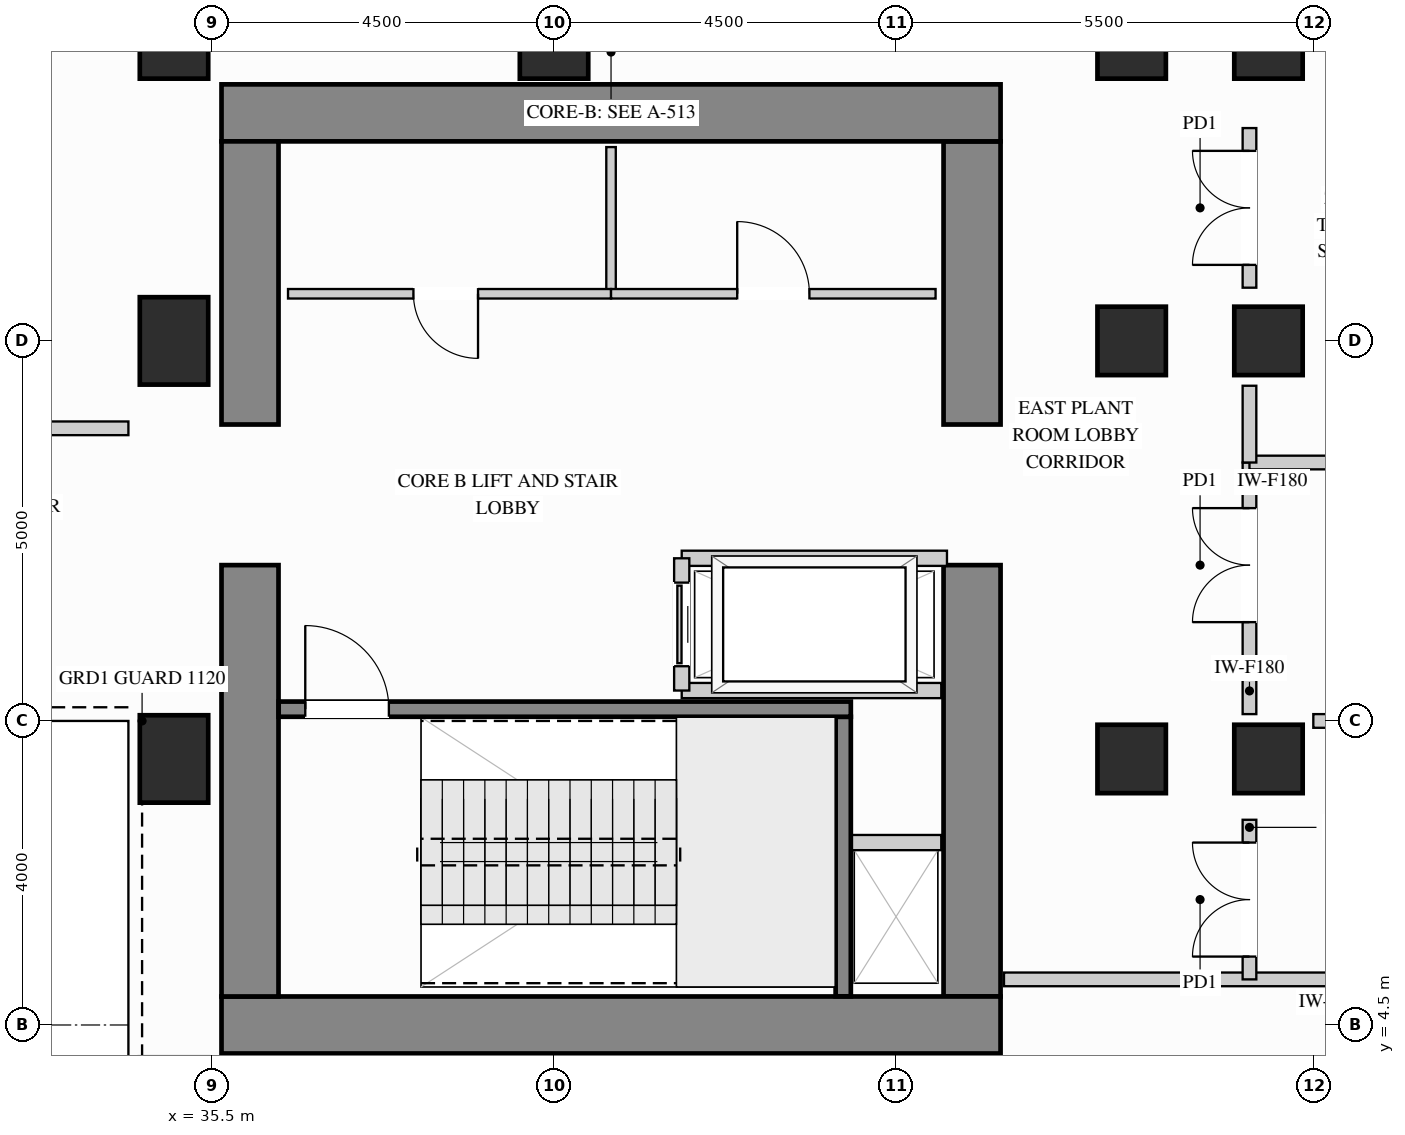
"""IFC4 building model, lengths in metres.
Left out: names, types, materials, properties, quantities, classifications, styles, units other than length and angle.
Written with IfcOpenShell. Run it as: python <this file> out.ifc"""

import sys

from ifc_helpers import new_model, si_unit, direction, frame, frame_2d, origin, origin_2d, place, context, subcontext, project, spatial, rectangle, extrude, source, transform, mapped, element, fill, save


model = new_model("IFC4")
c1 = context("Model", 3, precision=1e-05, world=origin(), true_north=direction((0.0, 1.0)))
c2 = subcontext(c1, "Body", "Model", "MODEL_VIEW")
j1 = project(units=[si_unit("LENGTHUNIT", "METRE"), si_unit("PLANEANGLEUNIT", "RADIAN")], contexts=[c1])
p1 = place(None, origin())
s1 = spatial("IfcSite", under=j1, at=p1, CompositionType="ELEMENT")
p2 = place(p1, origin())
s2 = spatial("IfcBuilding", under=s1, at=p2, CompositionType="ELEMENT")
p3 = place(p2, frame((0.0, 0.0, 138.6)))
s3 = spatial("IfcBuildingStorey", under=s2, at=p3, CompositionType="ELEMENT", Elevation=138.6)
m1 = source(origin(), c2, "Body", "SweptSolid", [
    extrude(rectangle(XDim=0.9, YDim=0.9, at=origin_2d()), origin(), (0.0, 0.0, 1.0), 4.26),
])
for number, where, z_axis, x_axis in (
    (1, (47.6, 13.5, 0.0), (0.0, 0.0, 1.0), (1.0, 0.0, 0.0)),
    (2, (47.6, 8.0, 0.0), (0.0, 0.0, 1.0), (1.0, 0.0, 0.0)),
    (3, (35.0, 17.4, 0.0), (0.0, 0.0, 1.0), (1.0, 0.0, 0.0)),
    (4, (40.0, 17.4, 0.0), (0.0, 0.0, 1.0), (1.0, 0.0, 0.0)),
    (5, (47.6, 17.4, 0.0), (0.0, 0.0, 1.0), (1.0, 0.0, 0.0)),
    (6, (49.4, 13.5, 0.0), (0.0, 0.0, 1.0), (1.0, 0.0, 0.0)),
    (7, (49.4, 17.4, 0.0), (0.0, 0.0, 1.0), (1.0, 0.0, 0.0)),
    (8, (49.4, 8.0, 0.0), (0.0, 0.0, 1.0), (1.0, 0.0, 0.0)),
):
    element("IfcColumn", number, at=place(p3, frame(where, z_axis=z_axis, x_axis=x_axis)), inside=s3, PredefinedType="COLUMN", context=c2, shape_type="MappedRepresentation", body=[
        mapped(m1, transform((0.0, 0.0, 0.0), x_axis=(1.0, 0.0, 0.0), y_axis=(0.0, 1.0, 0.0), z_axis=(0.0, 0.0, 1.0))),
    ])
m2 = source(origin(), c2, "Body", "SweptSolid", [
    extrude(rectangle(XDim=0.9, YDim=1.15, at=origin_2d()), origin(), (0.0, 0.0, 1.0), 4.26),
])
for number, where, z_axis, x_axis in (
    (9, (35.0, 13.5, 0.0), (0.0, 0.0, 1.0), (1.0, 0.0, 0.0)),
    (10, (35.0, 8.0, 0.0), (0.0, 0.0, 1.0), (1.0, 0.0, 0.0)),
):
    element("IfcColumn", number, at=place(p3, frame(where, z_axis=z_axis, x_axis=x_axis)), inside=s3, PredefinedType="COLUMN", context=c2, shape_type="MappedRepresentation", body=[
        mapped(m2, transform((0.0, 0.0, 0.0), x_axis=(1.0, 0.0, 0.0), y_axis=(0.0, 1.0, 0.0), z_axis=(0.0, 0.0, 1.0))),
    ])
m3 = source(origin(), c2, "Body", "SweptSolid", [
    extrude(rectangle(XDim=5.675, YDim=0.75, at=frame_2d((2.837, 0.0))), origin(), (0.0, 0.0, 1.0), 4.26),
])
p4 = place(p3, frame((45.5, 4.875, 0.0), z_axis=(0.0, 0.0, 1.0), x_axis=(0.0, 1.0, 0.0)))
e11 = element("IfcWall", 11, at=p4, inside=s3, PredefinedType="SHEAR", context=c2, shape_type="MappedRepresentation", body=[
    mapped(m3, transform((0.0, 0.0, 0.0), x_axis=(1.0, 0.0, 0.0), y_axis=(0.0, 1.0, 0.0), z_axis=(0.0, 0.0, 1.0))),
])
m4 = source(origin(), c2, "Body", "SweptSolid", [
    extrude(rectangle(XDim=3.725, YDim=0.75, at=frame_2d((1.863, 0.0))), origin(), (0.0, 0.0, 1.0), 4.26),
])
p5 = place(p3, frame((45.5, 12.4, 0.0), z_axis=(0.0, 0.0, 1.0), x_axis=(0.0, 1.0, 0.0)))
e12 = element("IfcWall", 12, at=p5, inside=s3, PredefinedType="SHEAR", context=c2, shape_type="MappedRepresentation", body=[
    mapped(m4, transform((0.0, 0.0, 0.0), x_axis=(1.0, 0.0, 0.0), y_axis=(0.0, 1.0, 0.0), z_axis=(0.0, 0.0, 1.0))),
])
m5 = source(origin(), c2, "Body", "SweptSolid", [
    extrude(rectangle(XDim=10.25, YDim=0.75, at=frame_2d((5.125, 0.0))), origin(), (0.0, 0.0, 1.0), 4.26),
])
for number, where, z_axis, x_axis in (
    (13, (35.625, 16.5, 0.0), (0.0, 0.0, 1.0), (1.0, 0.0, 0.0)),
    (14, (35.625, 4.5, 0.0), (0.0, 0.0, 1.0), (1.0, 0.0, 0.0)),
):
    element("IfcWall", number, at=place(p3, frame(where, z_axis=z_axis, x_axis=x_axis)), inside=s3, PredefinedType="SHEAR", context=c2, shape_type="MappedRepresentation", body=[
        mapped(m5, transform((0.0, 0.0, 0.0), x_axis=(1.0, 0.0, 0.0), y_axis=(0.0, 1.0, 0.0), z_axis=(0.0, 0.0, 1.0))),
    ])
p6 = place(p3, frame((36.0, 4.875, 0.0), z_axis=(0.0, 0.0, 1.0), x_axis=(0.0, 1.0, 0.0)))
e15 = element("IfcWall", 15, at=p6, inside=s3, PredefinedType="SHEAR", context=c2, shape_type="MappedRepresentation", body=[
    mapped(m3, transform((0.0, 0.0, 0.0), x_axis=(1.0, 0.0, 0.0), y_axis=(0.0, 1.0, 0.0), z_axis=(0.0, 0.0, 1.0))),
])
p7 = place(p3, frame((36.0, 12.4, 0.0), z_axis=(0.0, 0.0, 1.0), x_axis=(0.0, 1.0, 0.0)))
e16 = element("IfcWall", 16, at=p7, inside=s3, PredefinedType="SHEAR", context=c2, shape_type="MappedRepresentation", body=[
    mapped(m4, transform((0.0, 0.0, 0.0), x_axis=(1.0, 0.0, 0.0), y_axis=(0.0, 1.0, 0.0), z_axis=(0.0, 0.0, 1.0))),
])
p8 = place(p3, frame((49.15, 9.2, 0.0), z_axis=(0.0, 0.0, 1.0), x_axis=(0.0, 1.0, 0.0)))
e17 = element("IfcWall", 17, at=p8, inside=s3, PredefinedType="PARTITIONING", context=c2, shape_type="SweptSolid", body=[
    extrude(rectangle(XDim=2.7, YDim=0.18, at=frame_2d((1.35, 0.0))), origin(), (0.0, 0.0, 1.0), 3.245),
])
p9 = place(p8, frame((0.6, 0.0, 0.0)))
e18 = element("IfcOpeningElement", 18, at=p9, cuts=e17, PredefinedType="OPENING", context=c2, shape_type="SweptSolid", body=[
    extrude(rectangle(XDim=1.5, YDim=2.2, at=frame_2d((0.75, 1.1))), frame((0.0, 0.1, 0.0), z_axis=(0.0, -1.0, 0.0), x_axis=(1.0, 0.0, 0.0)), (0.0, 0.0, 1.0), 0.2),
])
m6 = source(origin(), c2, "Body", "SweptSolid", [
    extrude(rectangle(XDim=5.45, YDim=0.18, at=frame_2d((2.725, 0.0))), origin(), (0.0, 0.0, 1.0), 3.776),
])
p10 = place(p3, frame((49.15, 11.9, 0.0), z_axis=(0.0, 0.0, 1.0), x_axis=(1.0, 0.0, 0.0)))
e19 = element("IfcWall", 19, at=p10, inside=s3, PredefinedType="PARTITIONING", context=c2, shape_type="MappedRepresentation", body=[
    mapped(m6, transform((0.0, 0.0, 0.0), x_axis=(1.0, 0.0, 0.0), y_axis=(0.0, 1.0, 0.0), z_axis=(0.0, 0.0, 1.0))),
])
m7 = source(origin(), c2, "Body", "SweptSolid", [
    extrude(rectangle(XDim=8.68, YDim=0.18, at=frame_2d((4.34, 0.0))), origin(), (0.0, 0.0, 1.0), 4.245),
])
p11 = place(p3, frame((45.92, 5.1, 0.0), z_axis=(0.0, 0.0, 1.0), x_axis=(1.0, 0.0, 0.0)))
e20 = element("IfcWall", 20, at=p11, inside=s3, PredefinedType="PARTITIONING", context=c2, shape_type="MappedRepresentation", body=[
    mapped(m7, transform((0.0, 0.0, 0.0), x_axis=(1.0, 0.0, 0.0), y_axis=(0.0, 1.0, 0.0), z_axis=(0.0, 0.0, 1.0))),
])
p12 = place(p3, frame((49.15, 5.1, 0.0), z_axis=(0.0, 0.0, 1.0), x_axis=(0.0, 1.0, 0.0)))
e21 = element("IfcWall", 21, at=p12, inside=s3, PredefinedType="PARTITIONING", context=c2, shape_type="SweptSolid", body=[
    extrude(rectangle(XDim=2.1, YDim=0.18, at=frame_2d((1.05, 0.0))), origin(), (0.0, 0.0, 1.0), 3.245),
])
p13 = place(p12, frame((0.3, 0.0, 0.0)))
e22 = element("IfcOpeningElement", 22, at=p13, cuts=e21, PredefinedType="OPENING", context=c2, shape_type="SweptSolid", body=[
    extrude(rectangle(XDim=1.5, YDim=2.2, at=frame_2d((0.75, 1.1))), frame((0.0, 0.1, 0.0), z_axis=(0.0, -1.0, 0.0), x_axis=(1.0, 0.0, 0.0)), (0.0, 0.0, 1.0), 0.2),
])
m8 = source(origin(), c2, "Body", "SweptSolid", [
    extrude(rectangle(XDim=1.82, YDim=0.18, at=frame_2d((0.91, 0.0))), origin(), (0.0, 0.0, 1.0), 4.245),
])
p14 = place(p3, frame((49.99, 8.5, 0.0), z_axis=(0.0, 0.0, 1.0), x_axis=(1.0, 0.0, 0.0)))
e23 = element("IfcWall", 23, at=p14, inside=s3, PredefinedType="PARTITIONING", context=c2, shape_type="MappedRepresentation", body=[
    mapped(m8, transform((0.0, 0.0, 0.0), x_axis=(1.0, 0.0, 0.0), y_axis=(0.0, 1.0, 0.0), z_axis=(0.0, 0.0, 1.0))),
])
m9 = source(origin(), c2, "Body", "SweptSolid", [
    extrude(rectangle(XDim=0.61, YDim=0.18, at=frame_2d((0.305, 0.0))), origin(), (0.0, 0.0, 1.0), 3.245),
])
p15 = place(p3, frame((49.15, 8.59, 0.0), z_axis=(0.0, 0.0, 1.0), x_axis=(0.0, 1.0, 0.0)))
e24 = element("IfcWall", 24, at=p15, inside=s3, PredefinedType="PARTITIONING", context=c2, shape_type="MappedRepresentation", body=[
    mapped(m9, transform((0.0, 0.0, 0.0), x_axis=(1.0, 0.0, 0.0), y_axis=(0.0, 1.0, 0.0), z_axis=(0.0, 0.0, 1.0))),
])
m10 = source(origin(), c2, "Body", "SweptSolid", [
    extrude(rectangle(XDim=4.55, YDim=0.18, at=frame_2d((2.275, 0.0))), origin(), (0.0, 0.0, 1.0), 4.245),
])
p16 = place(p3, frame((29.85, 12.35, 0.0), z_axis=(0.0, 0.0, 1.0), x_axis=(1.0, 0.0, 0.0)))
e25 = element("IfcWall", 25, at=p16, inside=s3, PredefinedType="PARTITIONING", context=c2, shape_type="MappedRepresentation", body=[
    mapped(m10, transform((0.0, 0.0, 0.0), x_axis=(1.0, 0.0, 0.0), y_axis=(0.0, 1.0, 0.0), z_axis=(0.0, 0.0, 1.0))),
])
p17 = place(p3, frame((49.15, 14.2, 0.0), z_axis=(0.0, 0.0, 1.0), x_axis=(0.0, 1.0, 0.0)))
e26 = element("IfcWall", 26, at=p17, inside=s3, PredefinedType="PARTITIONING", context=c2, shape_type="SweptSolid", body=[
    extrude(rectangle(XDim=2.1, YDim=0.18, at=frame_2d((1.05, 0.0))), origin(), (0.0, 0.0, 1.0), 3.245),
])
p18 = place(p17, frame((0.3, 0.0, 0.0)))
e27 = element("IfcOpeningElement", 27, at=p18, cuts=e26, PredefinedType="OPENING", context=c2, shape_type="SweptSolid", body=[
    extrude(rectangle(XDim=1.5, YDim=2.2, at=frame_2d((0.75, 1.1))), frame((0.0, 0.1, 0.0), z_axis=(0.0, -1.0, 0.0), x_axis=(1.0, 0.0, 0.0)), (0.0, 0.0, 1.0), 0.2),
])
m11 = source(origin(), c2, "Body", "SweptSolid", [
    extrude(rectangle(XDim=1.01, YDim=0.18, at=frame_2d((0.505, 0.0))), origin(), (0.0, 0.0, 1.0), 3.245),
])
p19 = place(p3, frame((49.15, 11.9, 0.0), z_axis=(0.0, 0.0, 1.0), x_axis=(0.0, 1.0, 0.0)))
e28 = element("IfcWall", 28, at=p19, inside=s3, PredefinedType="PARTITIONING", context=c2, shape_type="MappedRepresentation", body=[
    mapped(m11, transform((0.0, 0.0, 0.0), x_axis=(1.0, 0.0, 0.0), y_axis=(0.0, 1.0, 0.0), z_axis=(0.0, 0.0, 1.0))),
])
m12 = source(origin(), c2, "Body", "SweptSolid", [
    extrude(rectangle(XDim=1.93, YDim=0.125, at=frame_2d((0.965, 0.0))), origin(), (0.0, 0.0, 1.0), 4.245),
])
p20 = place(p3, frame((40.75, 14.12, 0.0), z_axis=(0.0, 0.0, 1.0), x_axis=(0.0, 1.0, 0.0)))
e29 = element("IfcWall", 29, at=p20, inside=s3, PredefinedType="PARTITIONING", context=c2, shape_type="MappedRepresentation", body=[
    mapped(m12, transform((0.0, 0.0, 0.0), x_axis=(1.0, 0.0, 0.0), y_axis=(0.0, 1.0, 0.0), z_axis=(0.0, 0.0, 1.0))),
])
p21 = place(p3, frame((36.5, 14.12, 0.0), z_axis=(0.0, 0.0, 1.0), x_axis=(1.0, 0.0, 0.0)))
e30 = element("IfcWall", 30, at=p21, inside=s3, PredefinedType="PARTITIONING", context=c2, shape_type="SweptSolid", body=[
    extrude(rectangle(XDim=4.25, YDim=0.125, at=frame_2d((2.125, 0.0))), origin(), (0.0, 0.0, 1.0), 4.245),
])
p22 = place(p21, frame((1.65, 0.0, 0.0)))
e31 = element("IfcOpeningElement", 31, at=p22, cuts=e30, PredefinedType="OPENING", context=c2, shape_type="SweptSolid", body=[
    extrude(rectangle(XDim=0.85, YDim=2.1, at=frame_2d((0.425, 1.05))), frame((0.0, 0.073, 0.0), z_axis=(0.0, -1.0, 0.0), x_axis=(1.0, 0.0, 0.0)), (0.0, 0.0, 1.0), 0.145),
])
p23 = place(p3, frame((40.75, 14.12, 0.0), z_axis=(0.0, 0.0, 1.0), x_axis=(1.0, 0.0, 0.0)))
e32 = element("IfcWall", 32, at=p23, inside=s3, PredefinedType="PARTITIONING", context=c2, shape_type="SweptSolid", body=[
    extrude(rectangle(XDim=4.27, YDim=0.125, at=frame_2d((2.135, 0.0))), origin(), (0.0, 0.0, 1.0), 4.245),
])
p24 = place(p23, frame((1.66, 0.0, 0.0)))
e33 = element("IfcOpeningElement", 33, at=p24, cuts=e32, PredefinedType="OPENING", context=c2, shape_type="SweptSolid", body=[
    extrude(rectangle(XDim=0.95, YDim=2.15, at=frame_2d((0.475, 1.075))), frame((0.0, 0.073, 0.0), z_axis=(0.0, -1.0, 0.0), x_axis=(1.0, 0.0, 0.0)), (0.0, 0.0, 1.0), 0.145),
])
m13 = source(origin(), c2, "Body", "SweptSolid", [
    extrude(rectangle(XDim=1.245, YDim=0.2, at=frame_2d((0.623, 0.0))), origin(), (0.0, 0.0, 1.0), 4.245),
])
p25 = place(p3, frame((43.85, 6.9, 0.0), z_axis=(0.0, 0.0, 1.0), x_axis=(1.0, 0.0, 0.0)))
e34 = element("IfcWall", 34, at=p25, inside=s3, PredefinedType="PARTITIONING", context=c2, shape_type="MappedRepresentation", body=[
    mapped(m13, transform((0.0, 0.0, 0.0), x_axis=(1.0, 0.0, 0.0), y_axis=(0.0, 1.0, 0.0), z_axis=(0.0, 0.0, 1.0))),
])
m14 = source(origin(), c2, "Body", "SweptSolid", [
    extrude(rectangle(XDim=3.49, YDim=0.2, at=frame_2d((1.745, 0.0))), origin(), (0.0, 0.0, 1.0), 4.245),
])
p26 = place(p3, frame((41.68, 10.64, 0.0), z_axis=(0.0, 0.0, 1.0), x_axis=(1.0, 0.0, 0.0)))
e35 = element("IfcWall", 35, at=p26, inside=s3, PredefinedType="PARTITIONING", context=c2, shape_type="MappedRepresentation", body=[
    mapped(m14, transform((0.0, 0.0, 0.0), x_axis=(1.0, 0.0, 0.0), y_axis=(0.0, 1.0, 0.0), z_axis=(0.0, 0.0, 1.0))),
])
m15 = source(origin(), c2, "Body", "SweptSolid", [
    extrude(rectangle(XDim=3.415, YDim=0.2, at=frame_2d((1.708, 0.0))), origin(), (0.0, 0.0, 1.0), 4.245),
])
p27 = place(p3, frame((41.68, 8.9, 0.0), z_axis=(0.0, 0.0, 1.0), x_axis=(1.0, 0.0, 0.0)))
e36 = element("IfcWall", 36, at=p27, inside=s3, PredefinedType="PARTITIONING", context=c2, shape_type="MappedRepresentation", body=[
    mapped(m15, transform((0.0, 0.0, 0.0), x_axis=(1.0, 0.0, 0.0), y_axis=(0.0, 1.0, 0.0), z_axis=(0.0, 0.0, 1.0))),
])
p28 = place(p3, frame((41.68, 8.9, 0.0), z_axis=(0.0, 0.0, 1.0), x_axis=(0.0, 1.0, 0.0)))
e37 = element("IfcWall", 37, at=p28, inside=s3, PredefinedType="PARTITIONING", context=c2, shape_type="SweptSolid", body=[
    extrude(rectangle(XDim=1.74, YDim=0.2, at=frame_2d((0.87, 0.0))), origin(), (0.0, 0.0, 1.0), 4.245),
])
p29 = place(p28, frame((0.32, 0.0, 0.0)))
e38 = element("IfcOpeningElement", 38, at=p29, cuts=e37, PredefinedType="OPENING", context=c2, shape_type="SweptSolid", body=[
    extrude(rectangle(XDim=1.1, YDim=2.2, at=frame_2d((0.55, 1.1))), frame((0.0, 0.11, 0.0), z_axis=(0.0, -1.0, 0.0), x_axis=(1.0, 0.0, 0.0)), (0.0, 0.0, 1.0), 0.22),
])
m16 = source(origin(), c2, "Body", "SweptSolid", [
    extrude(rectangle(XDim=3.678, YDim=0.2, at=frame_2d((1.839, 0.0))), origin(), (0.0, 0.0, 1.0), 4.26),
])
p30 = place(p3, frame((43.805, 4.877, 0.0), z_axis=(0.0, 0.0, 1.0), x_axis=(0.0, 1.0, 0.0)))
e39 = element("IfcWall", 39, at=p30, inside=s3, PredefinedType="SHEAR", context=c2, shape_type="MappedRepresentation", body=[
    mapped(m16, transform((0.0, 0.0, 0.0), x_axis=(1.0, 0.0, 0.0), y_axis=(0.0, 1.0, 0.0), z_axis=(0.0, 0.0, 1.0))),
])
p31 = place(p3, frame((36.377, 8.655, 0.0), z_axis=(0.0, 0.0, 1.0), x_axis=(1.0, 0.0, 0.0)))
e40 = element("IfcWall", 40, at=p31, inside=s3, PredefinedType="SHEAR", context=c2, shape_type="SweptSolid", body=[
    extrude(rectangle(XDim=7.528, YDim=0.2, at=frame_2d((3.764, 0.0))), origin(), (0.0, 0.0, 1.0), 4.26),
])
p32 = place(p31, frame((0.35, 0.0, 0.0)))
e41 = element("IfcOpeningElement", 41, at=p32, cuts=e40, PredefinedType="OPENING", context=c2, shape_type="SweptSolid", body=[
    extrude(rectangle(XDim=1.1, YDim=2.15, at=frame_2d((0.55, 1.075))), frame((0.0, 0.11, 0.0), z_axis=(0.0, -1.0, 0.0), x_axis=(1.0, 0.0, 0.0)), (0.0, 0.0, 1.0), 0.22),
])
m17 = source(origin(), c2, "Body", "SweptSolid", [
    extrude(rectangle(XDim=1.1, YDim=2.2, at=frame_2d((0.55, 1.1))), frame((0.0, 0.025, 0.0), z_axis=(0.0, -1.0, 0.0), x_axis=(1.0, 0.0, 0.0)), (0.0, 0.0, 1.0), 0.05),
])
p33 = place(p29, origin())
e42 = element("IfcDoor", 42, at=p33, inside=s3, OperationType="SLIDING_TO_LEFT", PredefinedType="DOOR", context=c2, shape_type="MappedRepresentation", body=[
    mapped(m17, transform((0.0, 0.0, 0.0), x_axis=(1.0, 0.0, 0.0), y_axis=(0.0, 1.0, 0.0), z_axis=(0.0, 0.0, 1.0))),
])
fill(e38, e42)
m18 = source(origin(), c2, "Body", "SweptSolid", [
    extrude(rectangle(XDim=0.95, YDim=2.15, at=frame_2d((0.475, 1.075))), frame((0.0, 0.025, 0.0), z_axis=(0.0, -1.0, 0.0), x_axis=(1.0, 0.0, 0.0)), (0.0, 0.0, 1.0), 0.05),
])
p34 = place(p24, origin())
e43 = element("IfcDoor", 43, at=p34, inside=s3, OperationType="SINGLE_SWING_LEFT", PredefinedType="DOOR", context=c2, shape_type="MappedRepresentation", body=[
    mapped(m18, transform((0.0, 0.0, 0.0), x_axis=(1.0, 0.0, 0.0), y_axis=(0.0, 1.0, 0.0), z_axis=(0.0, 0.0, 1.0))),
])
fill(e33, e43)
m19 = source(origin(), c2, "Body", "SweptSolid", [
    extrude(rectangle(XDim=1.5, YDim=2.2, at=frame_2d((0.75, 1.1))), frame((0.0, 0.025, 0.0), z_axis=(0.0, -1.0, 0.0), x_axis=(1.0, 0.0, 0.0)), (0.0, 0.0, 1.0), 0.05),
])
p35 = place(p9, origin())
e44 = element("IfcDoor", 44, at=p35, inside=s3, OperationType="DOUBLE_DOOR_SINGLE_SWING", PredefinedType="DOOR", context=c2, shape_type="MappedRepresentation", body=[
    mapped(m19, transform((0.0, 0.0, 0.0), x_axis=(1.0, 0.0, 0.0), y_axis=(0.0, 1.0, 0.0), z_axis=(0.0, 0.0, 1.0))),
])
fill(e18, e44)
p36 = place(p13, origin())
e45 = element("IfcDoor", 45, at=p36, inside=s3, OperationType="DOUBLE_DOOR_SINGLE_SWING", PredefinedType="DOOR", context=c2, shape_type="MappedRepresentation", body=[
    mapped(m19, transform((0.0, 0.0, 0.0), x_axis=(1.0, 0.0, 0.0), y_axis=(0.0, 1.0, 0.0), z_axis=(0.0, 0.0, 1.0))),
])
fill(e22, e45)
p37 = place(p18, origin())
e46 = element("IfcDoor", 46, at=p37, inside=s3, OperationType="DOUBLE_DOOR_SINGLE_SWING", PredefinedType="DOOR", context=c2, shape_type="MappedRepresentation", body=[
    mapped(m19, transform((0.0, 0.0, 0.0), x_axis=(1.0, 0.0, 0.0), y_axis=(0.0, 1.0, 0.0), z_axis=(0.0, 0.0, 1.0))),
])
fill(e27, e46)
m20 = source(origin(), c2, "Body", "SweptSolid", [
    extrude(rectangle(XDim=0.85, YDim=2.1, at=frame_2d((0.425, 1.05))), frame((0.0, 0.025, 0.0), z_axis=(0.0, -1.0, 0.0), x_axis=(1.0, 0.0, 0.0)), (0.0, 0.0, 1.0), 0.05),
])
p38 = place(p22, origin())
e47 = element("IfcDoor", 47, at=p38, inside=s3, OperationType="SINGLE_SWING_RIGHT", PredefinedType="DOOR", context=c2, shape_type="MappedRepresentation", body=[
    mapped(m20, transform((0.0, 0.0, 0.0), x_axis=(1.0, 0.0, 0.0), y_axis=(0.0, 1.0, 0.0), z_axis=(0.0, 0.0, 1.0))),
])
fill(e31, e47)
m21 = source(origin(), c2, "Body", "SweptSolid", [
    extrude(rectangle(XDim=1.1, YDim=2.15, at=frame_2d((0.55, 1.075))), frame((0.0, 0.025, 0.0), z_axis=(0.0, -1.0, 0.0), x_axis=(1.0, 0.0, 0.0)), (0.0, 0.0, 1.0), 0.05),
])
p39 = place(p32, origin())
e48 = element("IfcDoor", 48, at=p39, inside=s3, OperationType="SINGLE_SWING_LEFT", PredefinedType="DOOR", context=c2, shape_type="MappedRepresentation", body=[
    mapped(m21, transform((0.0, 0.0, 0.0), x_axis=(1.0, 0.0, 0.0), y_axis=(0.0, 1.0, 0.0), z_axis=(0.0, 0.0, 1.0))),
])
fill(e41, e48)
save(model, sys.argv[1])
